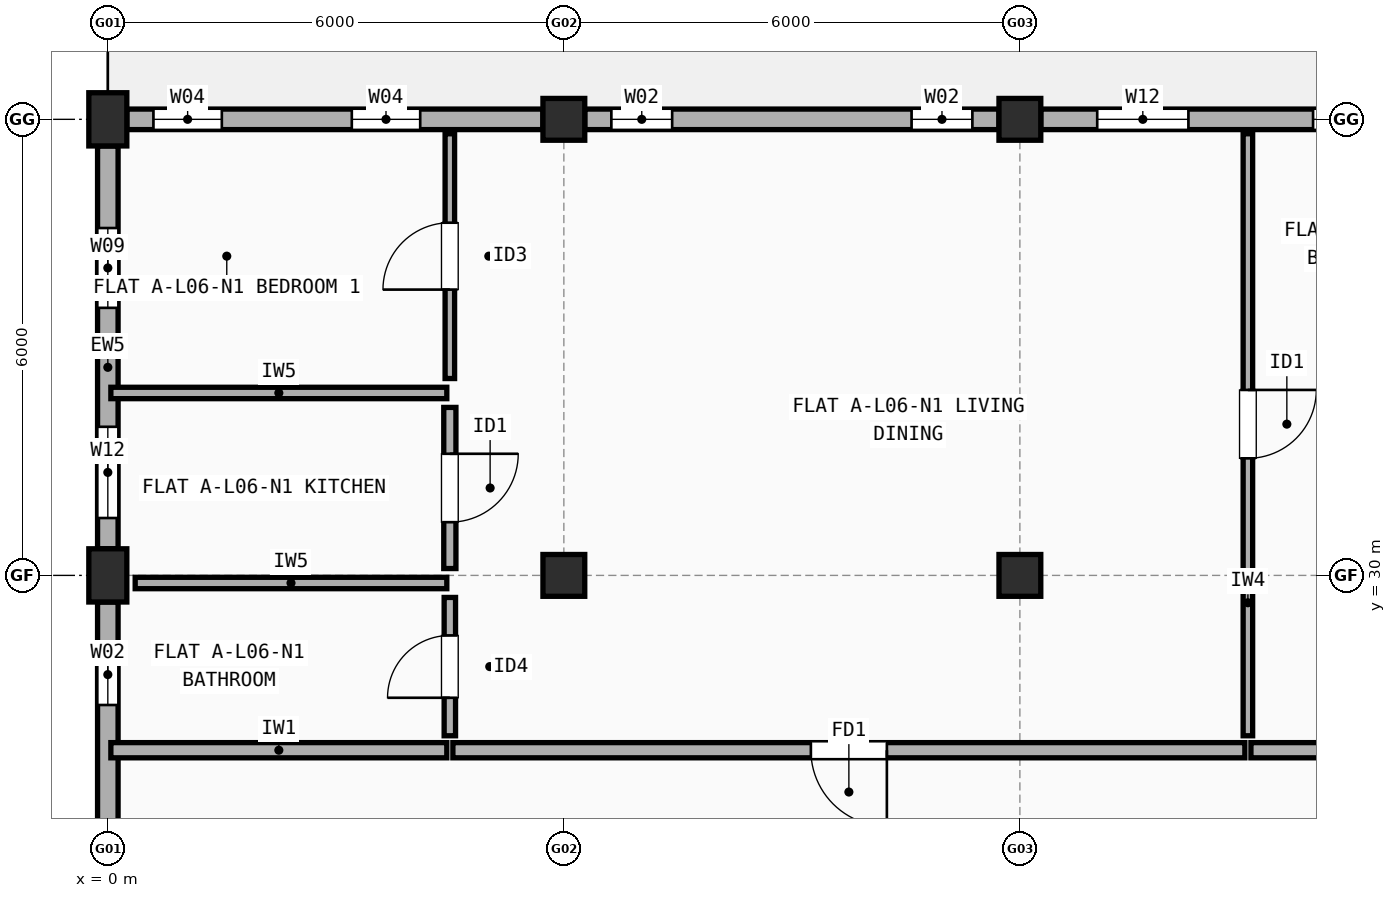
"""IFC4 building model, lengths in metres.
Left out: names, types, materials, properties, quantities, classifications, styles, units other than length and angle.
Written with IfcOpenShell. Run it as: python <this file> out.ifc"""

import sys

from ifc_helpers import new_model, si_unit, direction, frame, frame_2d, origin, origin_2d, place, context, subcontext, project, spatial, rectangle, extrude, element, fill, save


model = new_model("IFC4")
c1 = context("Model", 3, precision=1e-05, world=origin(), true_north=direction((0.0, 1.0)))
c2 = subcontext(c1, "Body", "Model", "MODEL_VIEW")
j1 = project(units=[si_unit("LENGTHUNIT", "METRE"), si_unit("PLANEANGLEUNIT", "RADIAN")], contexts=[c1])
p1 = place(None, origin())
s1 = spatial("IfcSite", under=j1, at=p1, CompositionType="ELEMENT")
p2 = place(p1, origin())
s2 = spatial("IfcBuilding", under=s1, at=p2, CompositionType="ELEMENT")
p3 = place(p2, frame((0.0, 0.0, 20.5)))
s3 = spatial("IfcBuildingStorey", under=s2, at=p3, CompositionType="ELEMENT", Elevation=20.5)
for number, where, z_axis, x_axis in (
    (1, (0.0, 30.0, 0.0), (0.0, 0.0, 1.0), (1.0, 0.0, 0.0)),
    (2, (0.0, 36.0, 0.0), (0.0, 0.0, 1.0), (1.0, 0.0, 0.0)),
):
    element("IfcColumn", number, at=place(p3, frame(where, z_axis=z_axis, x_axis=x_axis)), inside=s3, PredefinedType="COLUMN", context=c2, shape_type="SweptSolid", body=[
        extrude(rectangle(XDim=0.5, YDim=0.7, at=origin_2d()), origin(), (0.0, 0.0, 1.0), 2.97),
    ])
for number, where, z_axis, x_axis in (
    (3, (6.0, 30.0, 0.0), (0.0, 0.0, 1.0), (1.0, 0.0, 0.0)),
    (4, (6.0, 36.0, 0.0), (0.0, 0.0, 1.0), (1.0, 0.0, 0.0)),
    (5, (12.0, 30.0, 0.0), (0.0, 0.0, 1.0), (1.0, 0.0, 0.0)),
    (6, (12.0, 36.0, 0.0), (0.0, 0.0, 1.0), (1.0, 0.0, 0.0)),
):
    element("IfcColumn", number, at=place(p3, frame(where, z_axis=z_axis, x_axis=x_axis)), inside=s3, PredefinedType="COLUMN", context=c2, shape_type="SweptSolid", body=[
        extrude(rectangle(XDim=0.55, YDim=0.55, at=origin_2d()), origin(), (0.0, 0.0, 1.0), 2.97),
    ])
p4 = place(p3, frame((17.725, 36.0, 0.0), z_axis=(0.0, 0.0, 1.0), x_axis=(-1.0, 0.0, 0.0)))
e7 = element("IfcWall", 7, at=p4, inside=s3, PredefinedType="STANDARD", context=c2, shape_type="SweptSolid", body=[
    extrude(rectangle(XDim=5.45, YDim=0.27, at=frame_2d((2.725, 0.0))), origin(), (0.0, 0.0, 1.0), 2.452),
])
p5 = place(p4, frame((0.817, 0.0, 0.9)))
e8 = element("IfcOpeningElement", 8, at=p5, cuts=e7, PredefinedType="OPENING", context=c2, shape_type="SweptSolid", body=[
    extrude(rectangle(XDim=1.05, YDim=1.35, at=frame_2d((0.525, 0.675))), frame((0.0, 0.145, 0.0), z_axis=(0.0, -1.0, 0.0), x_axis=(1.0, 0.0, 0.0)), (0.0, 0.0, 1.0), 0.29),
])
p6 = place(p4, frame((3.508, 0.0, 0.9)))
e9 = element("IfcOpeningElement", 9, at=p6, cuts=e7, PredefinedType="OPENING", context=c2, shape_type="SweptSolid", body=[
    extrude(rectangle(XDim=1.2, YDim=1.35, at=frame_2d((0.6, 0.675))), frame((0.0, 0.145, 0.0), z_axis=(0.0, -1.0, 0.0), x_axis=(1.0, 0.0, 0.0)), (0.0, 0.0, 1.0), 0.29),
])
p7 = place(p3, frame((11.725, 36.0, 0.0), z_axis=(0.0, 0.0, 1.0), x_axis=(-1.0, 0.0, 0.0)))
e10 = element("IfcWall", 10, at=p7, inside=s3, PredefinedType="STANDARD", context=c2, shape_type="SweptSolid", body=[
    extrude(rectangle(XDim=5.45, YDim=0.27, at=frame_2d((2.725, 0.0))), origin(), (0.0, 0.0, 1.0), 2.452),
])
p8 = place(p7, frame((0.35, 0.0, 0.9)))
e11 = element("IfcOpeningElement", 11, at=p8, cuts=e10, PredefinedType="OPENING", context=c2, shape_type="SweptSolid", body=[
    extrude(rectangle(XDim=0.8, YDim=1.2, at=frame_2d((0.4, 0.6))), frame((0.0, 0.145, 0.0), z_axis=(0.0, -1.0, 0.0), x_axis=(1.0, 0.0, 0.0)), (0.0, 0.0, 1.0), 0.29),
])
p9 = place(p7, frame((4.3, 0.0, 0.9)))
e12 = element("IfcOpeningElement", 12, at=p9, cuts=e10, PredefinedType="OPENING", context=c2, shape_type="SweptSolid", body=[
    extrude(rectangle(XDim=0.8, YDim=1.2, at=frame_2d((0.4, 0.6))), frame((0.0, 0.145, 0.0), z_axis=(0.0, -1.0, 0.0), x_axis=(1.0, 0.0, 0.0)), (0.0, 0.0, 1.0), 0.29),
])
p10 = place(p3, frame((5.725, 36.0, 0.0), z_axis=(0.0, 0.0, 1.0), x_axis=(-1.0, 0.0, 0.0)))
e13 = element("IfcWall", 13, at=p10, inside=s3, PredefinedType="STANDARD", context=c2, shape_type="SweptSolid", body=[
    extrude(rectangle(XDim=5.475, YDim=0.27, at=frame_2d((2.738, 0.0))), origin(), (0.0, 0.0, 1.0), 2.452),
])
p11 = place(p10, frame((1.615, 0.0, 0.9)))
e14 = element("IfcOpeningElement", 14, at=p11, cuts=e13, PredefinedType="OPENING", context=c2, shape_type="SweptSolid", body=[
    extrude(rectangle(XDim=0.9, YDim=1.3, at=frame_2d((0.45, 0.65))), frame((0.0, 0.145, 0.0), z_axis=(0.0, -1.0, 0.0), x_axis=(1.0, 0.0, 0.0)), (0.0, 0.0, 1.0), 0.29),
])
p12 = place(p10, frame((4.225, 0.0, 0.9)))
e15 = element("IfcOpeningElement", 15, at=p12, cuts=e13, PredefinedType="OPENING", context=c2, shape_type="SweptSolid", body=[
    extrude(rectangle(XDim=0.9, YDim=1.3, at=frame_2d((0.45, 0.65))), frame((0.0, 0.145, 0.0), z_axis=(0.0, -1.0, 0.0), x_axis=(1.0, 0.0, 0.0)), (0.0, 0.0, 1.0), 0.29),
])
p13 = place(p3, frame((0.0, 35.65, 0.0), z_axis=(0.0, 0.0, 1.0), x_axis=(0.0, -1.0, 0.0)))
e16 = element("IfcWall", 16, at=p13, inside=s3, PredefinedType="STANDARD", context=c2, shape_type="SweptSolid", body=[
    extrude(rectangle(XDim=5.3, YDim=0.27, at=frame_2d((2.65, 0.0))), origin(), (0.0, 0.0, 1.0), 2.452),
])
p14 = place(p13, frame((1.08, 0.0, 0.9)))
e17 = element("IfcOpeningElement", 17, at=p14, cuts=e16, PredefinedType="OPENING", context=c2, shape_type="SweptSolid", body=[
    extrude(rectangle(XDim=1.05, YDim=1.35, at=frame_2d((0.525, 0.675))), frame((0.0, 0.145, 0.0), z_axis=(0.0, -1.0, 0.0), x_axis=(1.0, 0.0, 0.0)), (0.0, 0.0, 1.0), 0.29),
])
p15 = place(p13, frame((3.695, 0.0, 0.9)))
e18 = element("IfcOpeningElement", 18, at=p15, cuts=e16, PredefinedType="OPENING", context=c2, shape_type="SweptSolid", body=[
    extrude(rectangle(XDim=1.2, YDim=1.35, at=frame_2d((0.6, 0.675))), frame((0.0, 0.145, 0.0), z_axis=(0.0, -1.0, 0.0), x_axis=(1.0, 0.0, 0.0)), (0.0, 0.0, 1.0), 0.29),
])
p16 = place(p3, frame((0.0, 29.65, 0.0), z_axis=(0.0, 0.0, 1.0), x_axis=(0.0, -1.0, 0.0)))
e19 = element("IfcWall", 19, at=p16, inside=s3, PredefinedType="STANDARD", context=c2, shape_type="SweptSolid", body=[
    extrude(rectangle(XDim=5.3, YDim=0.27, at=frame_2d((2.65, 0.0))), origin(), (0.0, 0.0, 1.0), 2.452),
])
p17 = place(p16, frame((0.555, 0.0, 0.9)))
e20 = element("IfcOpeningElement", 20, at=p17, cuts=e19, PredefinedType="OPENING", context=c2, shape_type="SweptSolid", body=[
    extrude(rectangle(XDim=0.8, YDim=1.2, at=frame_2d((0.4, 0.6))), frame((0.0, 0.145, 0.0), z_axis=(0.0, -1.0, 0.0), x_axis=(1.0, 0.0, 0.0)), (0.0, 0.0, 1.0), 0.29),
])
p18 = place(p16, frame((3.22, 0.0, 0.9)))
e21 = element("IfcOpeningElement", 21, at=p18, cuts=e19, PredefinedType="OPENING", context=c2, shape_type="SweptSolid", body=[
    extrude(rectangle(XDim=0.85, YDim=1.25, at=frame_2d((0.425, 0.625))), frame((0.0, 0.145, 0.0), z_axis=(0.0, -1.0, 0.0), x_axis=(1.0, 0.0, 0.0)), (0.0, 0.0, 1.0), 0.29),
])
p19 = place(p3, frame((0.04, 27.7, 0.0), z_axis=(0.0, 0.0, 1.0), x_axis=(1.0, 0.0, 0.0)))
e22 = element("IfcWall", 22, at=p19, inside=s3, PredefinedType="SOLIDWALL", context=c2, shape_type="SweptSolid", body=[
    extrude(rectangle(XDim=4.42, YDim=0.2, at=frame_2d((2.21, 0.0))), origin(), (0.0, 0.0, 1.0), 2.452),
])
p20 = place(p3, frame((4.54, 27.7, 0.0), z_axis=(0.0, 0.0, 1.0), x_axis=(1.0, 0.0, 0.0)))
e23 = element("IfcWall", 23, at=p20, inside=s3, PredefinedType="SOLIDWALL", context=c2, shape_type="SweptSolid", body=[
    extrude(rectangle(XDim=10.42, YDim=0.2, at=frame_2d((5.21, 0.0))), origin(), (0.0, 0.0, 1.0), 2.508),
])
p21 = place(p20, frame((4.71, 0.0, 0.0)))
e24 = element("IfcOpeningElement", 24, at=p21, cuts=e23, PredefinedType="OPENING", context=c2, shape_type="SweptSolid", body=[
    extrude(rectangle(XDim=1.0, YDim=2.15, at=frame_2d((0.5, 1.075))), frame((0.0, 0.11, 0.0), z_axis=(0.0, -1.0, 0.0), x_axis=(1.0, 0.0, 0.0)), (0.0, 0.0, 1.0), 0.22),
])
p22 = place(p3, frame((4.5, 32.59, 0.0), z_axis=(0.0, 0.0, 1.0), x_axis=(0.0, 1.0, 0.0)))
e25 = element("IfcWall", 25, at=p22, inside=s3, PredefinedType="PARTITIONING", context=c2, shape_type="SweptSolid", body=[
    extrude(rectangle(XDim=3.22, YDim=0.125, at=frame_2d((1.61, 0.0))), origin(), (0.0, 0.0, 1.0), 2.97),
])
p23 = place(p22, frame((1.17, 0.0, 0.0)))
e26 = element("IfcOpeningElement", 26, at=p23, cuts=e25, PredefinedType="OPENING", context=c2, shape_type="SweptSolid", body=[
    extrude(rectangle(XDim=0.88, YDim=2.1, at=frame_2d((0.44, 1.05))), frame((0.0, 0.073, 0.0), z_axis=(0.0, -1.0, 0.0), x_axis=(1.0, 0.0, 0.0)), (0.0, 0.0, 1.0), 0.145),
])
p24 = place(p3, frame((4.5, 30.09, 0.0), z_axis=(0.0, 0.0, 1.0), x_axis=(0.0, 1.0, 0.0)))
e27 = element("IfcWall", 27, at=p24, inside=s3, PredefinedType="PLUMBINGWALL", context=c2, shape_type="SweptSolid", body=[
    extrude(rectangle(XDim=2.12, YDim=0.16, at=frame_2d((1.06, 0.0))), origin(), (0.0, 0.0, 1.0), 2.452),
])
p25 = place(p24, frame((0.61, 0.0, 0.0)))
e28 = element("IfcOpeningElement", 28, at=p25, cuts=e27, PredefinedType="OPENING", context=c2, shape_type="SweptSolid", body=[
    extrude(rectangle(XDim=0.9, YDim=2.1, at=frame_2d((0.45, 1.05))), frame((0.0, 0.09, 0.0), z_axis=(0.0, -1.0, 0.0), x_axis=(1.0, 0.0, 0.0)), (0.0, 0.0, 1.0), 0.18),
])
p26 = place(p3, frame((4.5, 27.89, 0.0), z_axis=(0.0, 0.0, 1.0), x_axis=(0.0, 1.0, 0.0)))
e29 = element("IfcWall", 29, at=p26, inside=s3, PredefinedType="PARTITIONING", context=c2, shape_type="SweptSolid", body=[
    extrude(rectangle(XDim=1.82, YDim=0.15, at=frame_2d((0.91, 0.0))), origin(), (0.0, 0.0, 1.0), 2.97),
])
p27 = place(p26, frame((0.5, 0.0, 0.0)))
e30 = element("IfcOpeningElement", 30, at=p27, cuts=e29, PredefinedType="OPENING", context=c2, shape_type="SweptSolid", body=[
    extrude(rectangle(XDim=0.82, YDim=2.08, at=frame_2d((0.41, 1.04))), frame((0.0, 0.085, 0.0), z_axis=(0.0, -1.0, 0.0), x_axis=(1.0, 0.0, 0.0)), (0.0, 0.0, 1.0), 0.17),
])
p28 = place(p3, frame((0.04, 32.4, 0.0), z_axis=(0.0, 0.0, 1.0), x_axis=(1.0, 0.0, 0.0)))
e31 = element("IfcWall", 31, at=p28, inside=s3, PredefinedType="PARTITIONING", context=c2, shape_type="SweptSolid", body=[
    extrude(rectangle(XDim=4.42, YDim=0.15, at=frame_2d((2.21, 0.0))), origin(), (0.0, 0.0, 1.0), 2.452),
])
p29 = place(p3, frame((0.36, 29.9, 0.0), z_axis=(0.0, 0.0, 1.0), x_axis=(1.0, 0.0, 0.0)))
e32 = element("IfcWall", 32, at=p29, inside=s3, PredefinedType="PARTITIONING", context=c2, shape_type="SweptSolid", body=[
    extrude(rectangle(XDim=4.1, YDim=0.15, at=frame_2d((2.05, 0.0))), origin(), (0.0, 0.0, 1.0), 2.452),
])
p30 = place(p3, frame((15.04, 27.7, 0.0), z_axis=(0.0, 0.0, 1.0), x_axis=(1.0, 0.0, 0.0)))
e33 = element("IfcWall", 33, at=p30, inside=s3, PredefinedType="SOLIDWALL", context=c2, shape_type="SweptSolid", body=[
    extrude(rectangle(XDim=2.92, YDim=0.2, at=frame_2d((1.46, 0.0))), origin(), (0.0, 0.0, 1.0), 2.97),
])
p31 = place(p3, frame((15.0, 27.89, 0.0), z_axis=(0.0, 0.0, 1.0), x_axis=(0.0, 1.0, 0.0)))
e34 = element("IfcWall", 34, at=p31, inside=s3, PredefinedType="PARTITIONING", context=c2, shape_type="SweptSolid", body=[
    extrude(rectangle(XDim=7.92, YDim=0.125, at=frame_2d((3.96, 0.0))), origin(), (0.0, 0.0, 1.0), 2.452),
])
p32 = place(p31, frame((3.65, 0.0, 0.0)))
e35 = element("IfcOpeningElement", 35, at=p32, cuts=e34, PredefinedType="OPENING", context=c2, shape_type="SweptSolid", body=[
    extrude(rectangle(XDim=0.9, YDim=2.1, at=frame_2d((0.45, 1.05))), frame((0.0, 0.073, 0.0), z_axis=(0.0, -1.0, 0.0), x_axis=(1.0, 0.0, 0.0)), (0.0, 0.0, 1.0), 0.145),
])
p33 = place(p5, origin())
e36 = element("IfcWindow", 36, at=p33, inside=s3, PartitioningType="SINGLE_PANEL", PredefinedType="WINDOW", context=c2, shape_type="SweptSolid", body=[
    extrude(rectangle(XDim=1.05, YDim=1.35, at=frame_2d((0.525, 0.675))), frame((0.0, 0.03, 0.0), z_axis=(0.0, -1.0, 0.0), x_axis=(1.0, 0.0, 0.0)), (0.0, 0.0, 1.0), 0.06),
])
fill(e8, e36)
p34 = place(p6, origin())
e37 = element("IfcWindow", 37, at=p34, inside=s3, PartitioningType="SINGLE_PANEL", PredefinedType="WINDOW", context=c2, shape_type="SweptSolid", body=[
    extrude(rectangle(XDim=1.2, YDim=1.35, at=frame_2d((0.6, 0.675))), frame((0.0, 0.03, 0.0), z_axis=(0.0, -1.0, 0.0), x_axis=(1.0, 0.0, 0.0)), (0.0, 0.0, 1.0), 0.06),
])
fill(e9, e37)
p35 = place(p8, origin())
e38 = element("IfcWindow", 38, at=p35, inside=s3, PartitioningType="SINGLE_PANEL", PredefinedType="WINDOW", context=c2, shape_type="SweptSolid", body=[
    extrude(rectangle(XDim=0.8, YDim=1.2, at=frame_2d((0.4, 0.6))), frame((0.0, 0.03, 0.0), z_axis=(0.0, -1.0, 0.0), x_axis=(1.0, 0.0, 0.0)), (0.0, 0.0, 1.0), 0.06),
])
fill(e11, e38)
p36 = place(p9, origin())
e39 = element("IfcWindow", 39, at=p36, inside=s3, PartitioningType="SINGLE_PANEL", PredefinedType="WINDOW", context=c2, shape_type="SweptSolid", body=[
    extrude(rectangle(XDim=0.8, YDim=1.2, at=frame_2d((0.4, 0.6))), frame((0.0, 0.03, 0.0), z_axis=(0.0, -1.0, 0.0), x_axis=(1.0, 0.0, 0.0)), (0.0, 0.0, 1.0), 0.06),
])
fill(e12, e39)
p37 = place(p11, origin())
e40 = element("IfcWindow", 40, at=p37, inside=s3, PartitioningType="SINGLE_PANEL", PredefinedType="WINDOW", context=c2, shape_type="SweptSolid", body=[
    extrude(rectangle(XDim=0.9, YDim=1.3, at=frame_2d((0.45, 0.65))), frame((0.0, 0.03, 0.0), z_axis=(0.0, -1.0, 0.0), x_axis=(1.0, 0.0, 0.0)), (0.0, 0.0, 1.0), 0.06),
])
fill(e14, e40)
p38 = place(p12, origin())
e41 = element("IfcWindow", 41, at=p38, inside=s3, PartitioningType="SINGLE_PANEL", PredefinedType="WINDOW", context=c2, shape_type="SweptSolid", body=[
    extrude(rectangle(XDim=0.9, YDim=1.3, at=frame_2d((0.45, 0.65))), frame((0.0, 0.03, 0.0), z_axis=(0.0, -1.0, 0.0), x_axis=(1.0, 0.0, 0.0)), (0.0, 0.0, 1.0), 0.06),
])
fill(e15, e41)
p39 = place(p14, origin())
e42 = element("IfcWindow", 42, at=p39, inside=s3, PartitioningType="SINGLE_PANEL", PredefinedType="WINDOW", context=c2, shape_type="SweptSolid", body=[
    extrude(rectangle(XDim=1.05, YDim=1.35, at=frame_2d((0.525, 0.675))), frame((0.0, 0.03, 0.0), z_axis=(0.0, -1.0, 0.0), x_axis=(1.0, 0.0, 0.0)), (0.0, 0.0, 1.0), 0.06),
])
fill(e17, e42)
p40 = place(p15, origin())
e43 = element("IfcWindow", 43, at=p40, inside=s3, PartitioningType="SINGLE_PANEL", PredefinedType="WINDOW", context=c2, shape_type="SweptSolid", body=[
    extrude(rectangle(XDim=1.2, YDim=1.35, at=frame_2d((0.6, 0.675))), frame((0.0, 0.03, 0.0), z_axis=(0.0, -1.0, 0.0), x_axis=(1.0, 0.0, 0.0)), (0.0, 0.0, 1.0), 0.06),
])
fill(e18, e43)
p41 = place(p17, origin())
e44 = element("IfcWindow", 44, at=p41, inside=s3, PartitioningType="SINGLE_PANEL", PredefinedType="WINDOW", context=c2, shape_type="SweptSolid", body=[
    extrude(rectangle(XDim=0.8, YDim=1.2, at=frame_2d((0.4, 0.6))), frame((0.0, 0.03, 0.0), z_axis=(0.0, -1.0, 0.0), x_axis=(1.0, 0.0, 0.0)), (0.0, 0.0, 1.0), 0.06),
])
fill(e20, e44)
p42 = place(p21, origin())
e45 = element("IfcDoor", 45, at=p42, inside=s3, OperationType="SINGLE_SWING_RIGHT", PredefinedType="DOOR", context=c2, shape_type="SweptSolid", body=[
    extrude(rectangle(XDim=1.0, YDim=2.15, at=frame_2d((0.5, 1.075))), frame((0.0, 0.025, 0.0), z_axis=(0.0, -1.0, 0.0), x_axis=(1.0, 0.0, 0.0)), (0.0, 0.0, 1.0), 0.05),
])
fill(e24, e45)
p43 = place(p23, origin())
e46 = element("IfcDoor", 46, at=p43, inside=s3, OperationType="SINGLE_SWING_LEFT", PredefinedType="DOOR", context=c2, shape_type="SweptSolid", body=[
    extrude(rectangle(XDim=0.88, YDim=2.1, at=frame_2d((0.44, 1.05))), frame((0.0, 0.025, 0.0), z_axis=(0.0, -1.0, 0.0), x_axis=(1.0, 0.0, 0.0)), (0.0, 0.0, 1.0), 0.05),
])
fill(e26, e46)
p44 = place(p25, origin())
e47 = element("IfcDoor", 47, at=p44, inside=s3, OperationType="SINGLE_SWING_RIGHT", PredefinedType="DOOR", context=c2, shape_type="SweptSolid", body=[
    extrude(rectangle(XDim=0.9, YDim=2.1, at=frame_2d((0.45, 1.05))), frame((0.0, 0.025, 0.0), z_axis=(0.0, -1.0, 0.0), x_axis=(1.0, 0.0, 0.0)), (0.0, 0.0, 1.0), 0.05),
])
fill(e28, e47)
p45 = place(p27, origin())
e48 = element("IfcDoor", 48, at=p45, inside=s3, OperationType="SINGLE_SWING_LEFT", PredefinedType="DOOR", context=c2, shape_type="SweptSolid", body=[
    extrude(rectangle(XDim=0.82, YDim=2.08, at=frame_2d((0.41, 1.04))), frame((0.0, 0.025, 0.0), z_axis=(0.0, -1.0, 0.0), x_axis=(1.0, 0.0, 0.0)), (0.0, 0.0, 1.0), 0.05),
])
fill(e30, e48)
p46 = place(p32, origin())
e49 = element("IfcDoor", 49, at=p46, inside=s3, OperationType="SINGLE_SWING_RIGHT", PredefinedType="DOOR", context=c2, shape_type="SweptSolid", body=[
    extrude(rectangle(XDim=0.9, YDim=2.1, at=frame_2d((0.45, 1.05))), frame((0.0, 0.025, 0.0), z_axis=(0.0, -1.0, 0.0), x_axis=(1.0, 0.0, 0.0)), (0.0, 0.0, 1.0), 0.05),
])
fill(e35, e49)
save(model, sys.argv[1])
